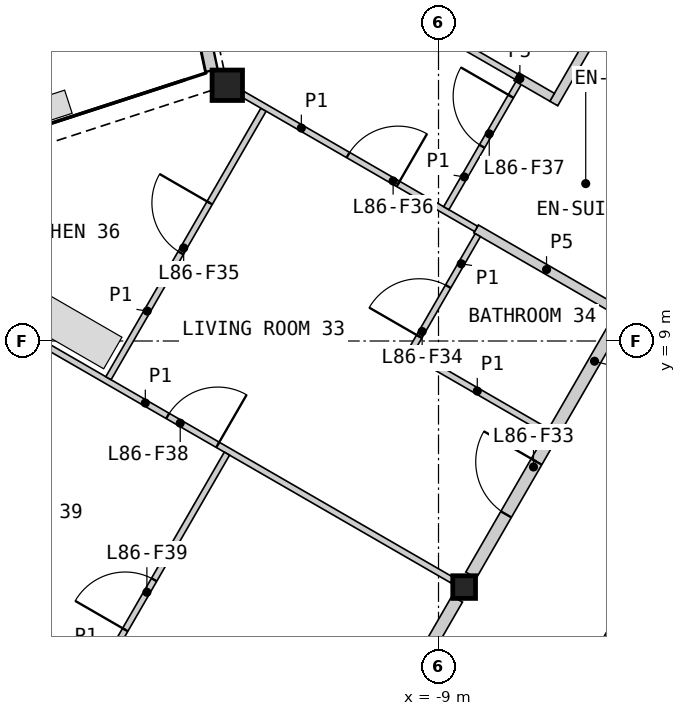
"""IFC4 building model, lengths in metres.
Left out: names, types, materials, properties, quantities, classifications, styles, units other than length and angle.
Written with IfcOpenShell. Run it as: python <this file> out.ifc"""

import sys

from ifc_helpers import new_model, si_unit, direction, frame, frame_2d, origin, origin_2d, place, context, subcontext, project, spatial, polyline, rectangle, hollow_rectangle, i_section, outline, extrude, element, fill, save


model = new_model("IFC4")
c1 = context("Model", 3, precision=1e-05, world=origin(), true_north=direction((0.0, 1.0)))
c2 = subcontext(c1, "Body", "Model", "MODEL_VIEW")
j1 = project(units=[si_unit("LENGTHUNIT", "METRE"), si_unit("PLANEANGLEUNIT", "RADIAN")], contexts=[c1])
p1 = place(None, origin())
s1 = spatial("IfcSite", under=j1, at=p1, CompositionType="ELEMENT")
p2 = place(p1, origin())
s2 = spatial("IfcBuilding", under=s1, at=p2, CompositionType="ELEMENT")
p3 = place(p2, frame((0.0, 0.0, 381.4)))
s3 = spatial("IfcBuildingStorey", under=s2, at=p3, CompositionType="ELEMENT", Elevation=381.4)
p4 = place(p3, frame((-12.474, 13.206, 0.0), z_axis=(0.0, 0.0, 1.0), x_axis=(1.0, 0.0, 0.0)))
e1 = element("IfcColumn", 1, at=p4, inside=s3, PredefinedType="COLUMN", context=c2, shape_type="SweptSolid", body=[
    extrude(hollow_rectangle(XDim=0.5, YDim=0.5, WallThickness=0.03, at=origin_2d()), origin(), (0.0, 0.0, 1.0), 3.4),
])
p5 = place(p3, frame((-8.578, 4.953, 0.0), z_axis=(0.0, 0.0, 1.0), x_axis=(1.0, 0.0, 0.0)))
e2 = element("IfcColumn", 2, at=p5, inside=s3, PredefinedType="COLUMN", context=c2, shape_type="SweptSolid", body=[
    extrude(i_section(OverallWidth=0.374, OverallDepth=0.372, WebThickness=0.016, FlangeThickness=0.026, at=origin_2d()), origin(), (0.0, 0.0, 1.0), 3.4),
])
p6 = place(p3, frame((-14.104, 19.915, 0.0), z_axis=(0.0, 0.0, 1.0), x_axis=(0.207924998532, -0.978144771997, 0.0)))
e3 = element("IfcWall", 3, at=p6, inside=s3, PredefinedType="SOLIDWALL", context=c2, shape_type="SweptSolid", body=[
    extrude(rectangle(XDim=6.612, YDim=0.2, at=frame_2d((3.306, 0.0))), origin(), (0.0, 0.0, 1.0), 2.634),
])
p7 = place(p6, frame((2.333, 0.0, 0.0)))
e4 = element("IfcOpeningElement", 4, at=p7, cuts=e3, PredefinedType="OPENING", context=c2, shape_type="SweptSolid", body=[
    extrude(rectangle(XDim=1.6, YDim=2.25, at=frame_2d((0.8, 1.125))), frame((0.0, 0.11, 0.0), z_axis=(0.0, -1.0, 0.0), x_axis=(1.0, 0.0, 0.0)), (0.0, 0.0, 1.0), 0.22),
])
p8 = place(p3, origin())
e5 = element("IfcWall", 5, at=p8, inside=s3, PredefinedType="SHEAR", context=c2, shape_type="SweptSolid", body=[
    extrude(outline(polyline([(-4.96, 0.208), (-7.131, 1.461), (-3.731, 7.35), (-1.561, 6.097), (-1.66, 5.924), (-3.652, 7.074), (-4.652, 5.342), (-2.66, 4.192), (-2.76, 4.019), (-4.752, 5.169), (-6.852, 1.531), (-4.861, 0.381), (-4.96, 0.208)])), origin(), (0.0, 0.0, 1.0), 3.1),
])
p9 = place(p3, frame((-3.639, 8.107, 0.0), z_axis=(0.0, 0.0, 1.0), x_axis=(-0.49999180351, -0.866030135978, 0.0)))
e6 = element("IfcWall", 6, at=p9, inside=s3, PredefinedType="SHEAR", context=c2, shape_type="SweptSolid", body=[
    extrude(rectangle(XDim=7.401, YDim=0.6, at=frame_2d((3.701, 0.0))), origin(), (0.0, 0.0, 1.0), 3.1),
])
p10 = place(p3, frame((-8.465, 5.15, 0.0), z_axis=(0.0, 0.0, 1.0), x_axis=(0.499992155518, 0.866029932751, 0.0)))
e7 = element("IfcWall", 7, at=p10, inside=s3, PredefinedType="PARTITIONING", context=c2, shape_type="SweptSolid", body=[
    extrude(rectangle(XDim=8.123, YDim=0.2, at=frame_2d((4.062, 0.0))), origin(), (0.0, 0.0, 1.0), 3.1),
])
p11 = place(p10, frame((1.153, 0.0, 0.0)))
e8 = element("IfcOpeningElement", 8, at=p11, cuts=e7, PredefinedType="OPENING", context=c2, shape_type="SweptSolid", body=[
    extrude(rectangle(XDim=1.0, YDim=2.1, at=frame_2d((0.5, 1.05))), frame((0.0, 0.11, 0.0), z_axis=(0.0, -1.0, 0.0), x_axis=(1.0, 0.0, 0.0)), (0.0, 0.0, 1.0), 0.22),
])
p12 = place(p3, frame((-12.754, -2.279, 0.0), z_axis=(0.0, 0.0, 1.0), x_axis=(0.500001682468, 0.866024432409, 0.0)))
e9 = element("IfcWall", 9, at=p12, inside=s3, PredefinedType="PARTITIONING", context=c2, shape_type="SweptSolid", body=[
    extrude(rectangle(XDim=8.124, YDim=0.2, at=frame_2d((4.062, 0.0))), origin(), (0.0, 0.0, 1.0), 3.1),
])
p13 = place(p12, frame((1.153, 0.0, 0.0)))
e10 = element("IfcOpeningElement", 10, at=p13, cuts=e9, PredefinedType="OPENING", context=c2, shape_type="SweptSolid", body=[
    extrude(rectangle(XDim=1.0, YDim=2.1, at=frame_2d((0.5, 1.05))), frame((0.0, 0.11, 0.0), z_axis=(0.0, -1.0, 0.0), x_axis=(1.0, 0.0, 0.0)), (0.0, 0.0, 1.0), 0.22),
])
p14 = place(p3, frame((-17.414, 4.049, 0.0), z_axis=(0.0, 0.0, 1.0), x_axis=(0.866033839264, -0.499985389037, 0.0)))
e11 = element("IfcWall", 11, at=p14, inside=s3, PredefinedType="PARTITIONING", context=c2, shape_type="SweptSolid", body=[
    extrude(rectangle(XDim=7.1, YDim=0.25, at=frame_2d((3.55, 0.0))), origin(), (0.0, 0.0, 1.0), 2.33),
])
p15 = place(p3, frame((-8.382, 10.844, 0.0), z_axis=(0.0, 0.0, 1.0), x_axis=(0.866021425885, -0.500006889861, 0.0)))
e12 = element("IfcWall", 12, at=p15, inside=s3, PredefinedType="PLUMBINGWALL", context=c2, shape_type="SweptSolid", body=[
    extrude(rectangle(XDim=2.675, YDim=0.15, at=frame_2d((1.337, 0.0))), origin(), (0.0, 0.0, 1.0), 2.33),
])
p16 = place(p3, frame((-7.104, 12.906, 0.0), z_axis=(0.0, 0.0, 1.0), x_axis=(0.499993606316, 0.866029095148, 0.0)))
e13 = element("IfcWall", 13, at=p16, inside=s3, PredefinedType="PLUMBINGWALL", context=c2, shape_type="SweptSolid", body=[
    extrude(rectangle(XDim=2.65, YDim=0.15, at=frame_2d((1.325, 0.0))), origin(), (0.0, 0.0, 1.0), 2.33),
])
p17 = place(p3, frame((-7.72, 13.349, 0.0), z_axis=(0.0, 0.0, 1.0), x_axis=(0.866113839764, -0.499846793097, 0.0)))
e14 = element("IfcWall", 14, at=p17, inside=s3, PredefinedType="PLUMBINGWALL", context=c2, shape_type="SweptSolid", body=[
    extrude(rectangle(XDim=0.68, YDim=0.15, at=frame_2d((0.34, 0.0))), origin(), (0.0, 0.0, 1.0), 2.33),
])
p18 = place(p3, frame((-18.869, 10.894, 0.0), z_axis=(0.0, 0.0, 1.0), x_axis=(0.866023724155, -0.500002909193, 0.0)))
e15 = element("IfcWall", 15, at=p18, inside=s3, PredefinedType="PARTITIONING", context=c2, shape_type="SweptSolid", body=[
    extrude(rectangle(XDim=11.655, YDim=0.1, at=frame_2d((5.827, 0.0))), origin(), (0.0, 0.0, 1.0), 2.33),
])
p19 = place(p18, frame((6.253, 0.0, 0.0)))
e16 = element("IfcOpeningElement", 16, at=p19, cuts=e15, PredefinedType="OPENING", context=c2, shape_type="SweptSolid", body=[
    extrude(rectangle(XDim=0.95, YDim=2.1, at=frame_2d((0.475, 1.05))), frame((0.0, 0.06, 0.0), z_axis=(0.0, -1.0, 0.0), x_axis=(1.0, 0.0, 0.0)), (0.0, 0.0, 1.0), 0.12),
])
p20 = place(p3, frame((-14.992, 2.796, 0.0), z_axis=(0.0, 0.0, 1.0), x_axis=(0.499990214365, 0.86603105345, 0.0)))
e17 = element("IfcWall", 17, at=p20, inside=s3, PredefinedType="PARTITIONING", context=c2, shape_type="SweptSolid", body=[
    extrude(rectangle(XDim=5.025, YDim=0.1, at=frame_2d((2.512, 0.0))), origin(), (0.0, 0.0, 1.0), 2.33),
])
p21 = place(p20, frame((1.68, 0.0, 0.0)))
e18 = element("IfcOpeningElement", 18, at=p21, cuts=e17, PredefinedType="OPENING", context=c2, shape_type="SweptSolid", body=[
    extrude(rectangle(XDim=0.95, YDim=2.1, at=frame_2d((0.475, 1.05))), frame((0.0, 0.06, 0.0), z_axis=(0.0, -1.0, 0.0), x_axis=(1.0, 0.0, 0.0)), (0.0, 0.0, 1.0), 0.12),
])
p22 = place(p3, frame((-14.428, 8.388, 0.0), z_axis=(0.0, 0.0, 1.0), x_axis=(0.500005610874, 0.86602216432, 0.0)))
e19 = element("IfcWall", 19, at=p22, inside=s3, PredefinedType="PARTITIONING", context=c2, shape_type="SweptSolid", body=[
    extrude(rectangle(XDim=5.1, YDim=0.1, at=frame_2d((2.55, 0.0))), origin(), (0.0, 0.0, 1.0), 2.33),
])
p23 = place(p22, frame((2.379, 0.0, 0.0)))
e20 = element("IfcOpeningElement", 20, at=p23, cuts=e19, PredefinedType="OPENING", context=c2, shape_type="SweptSolid", body=[
    extrude(rectangle(XDim=0.95, YDim=2.1, at=frame_2d((0.475, 1.05))), frame((0.0, 0.06, 0.0), z_axis=(0.0, -1.0, 0.0), x_axis=(1.0, 0.0, 0.0)), (0.0, 0.0, 1.0), 0.12),
])
p24 = place(p3, frame((-12.214, 13.056, 0.0), z_axis=(0.0, 0.0, 1.0), x_axis=(0.866017452598, -0.500013771606, 0.0)))
e21 = element("IfcWall", 21, at=p24, inside=s3, PredefinedType="PARTITIONING", context=c2, shape_type="SweptSolid", body=[
    extrude(rectangle(XDim=4.425, YDim=0.1, at=frame_2d((2.213, 0.0))), origin(), (0.0, 0.0, 1.0), 2.33),
])
p25 = place(p24, frame((1.994, 0.0, 0.0)))
e22 = element("IfcOpeningElement", 22, at=p25, cuts=e21, PredefinedType="OPENING", context=c2, shape_type="SweptSolid", body=[
    extrude(rectangle(XDim=0.95, YDim=2.1, at=frame_2d((0.475, 1.05))), frame((0.0, 0.06, 0.0), z_axis=(0.0, -1.0, 0.0), x_axis=(1.0, 0.0, 0.0)), (0.0, 0.0, 1.0), 0.12),
])
p26 = place(p3, frame((-9.51, 8.839, 0.0), z_axis=(0.0, 0.0, 1.0), x_axis=(0.866029095148, -0.499993606316, 0.0)))
e23 = element("IfcWall", 23, at=p26, inside=s3, PredefinedType="PARTITIONING", context=c2, shape_type="SweptSolid", body=[
    extrude(rectangle(XDim=2.65, YDim=0.1, at=frame_2d((1.325, 0.0))), origin(), (0.0, 0.0, 1.0), 2.33),
])
p27 = place(p3, frame((-8.872, 11.184, 0.0), z_axis=(0.0, 0.0, 1.0), x_axis=(0.499986429846, 0.866033238375, 0.0)))
e24 = element("IfcWall", 24, at=p27, inside=s3, PredefinedType="PARTITIONING", context=c2, shape_type="SweptSolid", body=[
    extrude(rectangle(XDim=2.375, YDim=0.1, at=frame_2d((1.188, 0.0))), origin(), (0.0, 0.0, 1.0), 2.33),
])
p28 = place(p27, frame((1.175, 0.0, 0.0)))
e25 = element("IfcOpeningElement", 25, at=p28, cuts=e24, PredefinedType="OPENING", context=c2, shape_type="SweptSolid", body=[
    extrude(rectangle(XDim=0.95, YDim=2.1, at=frame_2d((0.475, 1.05))), frame((0.0, 0.06, 0.0), z_axis=(0.0, -1.0, 0.0), x_axis=(1.0, 0.0, 0.0)), (0.0, 0.0, 1.0), 0.12),
])
p29 = place(p3, frame((-9.442, 8.858, 0.0), z_axis=(0.0, 0.0, 1.0), x_axis=(0.499978335414, 0.866037911478, 0.0)))
e26 = element("IfcWall", 26, at=p29, inside=s3, PredefinedType="PARTITIONING", context=c2, shape_type="SweptSolid", body=[
    extrude(rectangle(XDim=2.175, YDim=0.1, at=frame_2d((1.087, 0.0))), origin(), (0.0, 0.0, 1.0), 2.33),
])
p30 = place(p29, frame((0.25, 0.0, 0.0)))
e27 = element("IfcOpeningElement", 27, at=p30, cuts=e26, PredefinedType="OPENING", context=c2, shape_type="SweptSolid", body=[
    extrude(rectangle(XDim=0.95, YDim=2.1, at=frame_2d((0.475, 1.05))), frame((0.0, 0.06, 0.0), z_axis=(0.0, -1.0, 0.0), x_axis=(1.0, 0.0, 0.0)), (0.0, 0.0, 1.0), 0.12),
])
p31 = place(p3, frame((-9.448, 14.346, 0.0), z_axis=(0.0, 0.0, 1.0), x_axis=(0.866020521143, -0.500008456887, 0.0)))
e28 = element("IfcWall", 28, at=p31, inside=s3, PredefinedType="PARTITIONING", context=c2, shape_type="SweptSolid", body=[
    extrude(rectangle(XDim=1.995, YDim=0.1, at=frame_2d((0.998, 0.0))), origin(), (0.0, 0.0, 1.0), 2.33),
])
p32 = place(p11, origin())
e29 = element("IfcDoor", 29, at=p32, inside=s3, OperationType="SINGLE_SWING_RIGHT", PredefinedType="DOOR", context=c2, shape_type="SweptSolid", body=[
    extrude(rectangle(XDim=1.0, YDim=2.1, at=frame_2d((0.5, 1.05))), frame((0.0, 0.025, 0.0), z_axis=(0.0, -1.0, 0.0), x_axis=(1.0, 0.0, 0.0)), (0.0, 0.0, 1.0), 0.05),
])
fill(e8, e29)
p33 = place(p30, origin())
e30 = element("IfcDoor", 30, at=p33, inside=s3, OperationType="SINGLE_SWING_LEFT", PredefinedType="DOOR", context=c2, shape_type="SweptSolid", body=[
    extrude(rectangle(XDim=0.95, YDim=2.1, at=frame_2d((0.475, 1.05))), frame((0.0, 0.025, 0.0), z_axis=(0.0, -1.0, 0.0), x_axis=(1.0, 0.0, 0.0)), (0.0, 0.0, 1.0), 0.05),
])
fill(e27, e30)
p34 = place(p23, origin())
e31 = element("IfcDoor", 31, at=p34, inside=s3, OperationType="SINGLE_SWING_RIGHT", PredefinedType="DOOR", context=c2, shape_type="SweptSolid", body=[
    extrude(rectangle(XDim=0.95, YDim=2.1, at=frame_2d((0.475, 1.05))), frame((0.0, 0.025, 0.0), z_axis=(0.0, -1.0, 0.0), x_axis=(1.0, 0.0, 0.0)), (0.0, 0.0, 1.0), 0.05),
])
fill(e20, e31)
p35 = place(p25, origin())
e32 = element("IfcDoor", 32, at=p35, inside=s3, OperationType="SINGLE_SWING_RIGHT", PredefinedType="DOOR", context=c2, shape_type="SweptSolid", body=[
    extrude(rectangle(XDim=0.95, YDim=2.1, at=frame_2d((0.475, 1.05))), frame((0.0, 0.025, 0.0), z_axis=(0.0, -1.0, 0.0), x_axis=(1.0, 0.0, 0.0)), (0.0, 0.0, 1.0), 0.05),
])
fill(e22, e32)
p36 = place(p28, origin())
e33 = element("IfcDoor", 33, at=p36, inside=s3, OperationType="SINGLE_SWING_RIGHT", PredefinedType="DOOR", context=c2, shape_type="SweptSolid", body=[
    extrude(rectangle(XDim=0.95, YDim=2.1, at=frame_2d((0.475, 1.05))), frame((0.0, 0.025, 0.0), z_axis=(0.0, -1.0, 0.0), x_axis=(1.0, 0.0, 0.0)), (0.0, 0.0, 1.0), 0.05),
])
fill(e25, e33)
p37 = place(p19, origin())
e34 = element("IfcDoor", 34, at=p37, inside=s3, OperationType="SINGLE_SWING_RIGHT", PredefinedType="DOOR", context=c2, shape_type="SweptSolid", body=[
    extrude(rectangle(XDim=0.95, YDim=2.1, at=frame_2d((0.475, 1.05))), frame((0.0, 0.025, 0.0), z_axis=(0.0, -1.0, 0.0), x_axis=(1.0, 0.0, 0.0)), (0.0, 0.0, 1.0), 0.05),
])
fill(e16, e34)
p38 = place(p21, origin())
e35 = element("IfcDoor", 35, at=p38, inside=s3, OperationType="SINGLE_SWING_LEFT", PredefinedType="DOOR", context=c2, shape_type="SweptSolid", body=[
    extrude(rectangle(XDim=0.95, YDim=2.1, at=frame_2d((0.475, 1.05))), frame((0.0, 0.025, 0.0), z_axis=(0.0, -1.0, 0.0), x_axis=(1.0, 0.0, 0.0)), (0.0, 0.0, 1.0), 0.05),
])
fill(e18, e35)
save(model, sys.argv[1])
